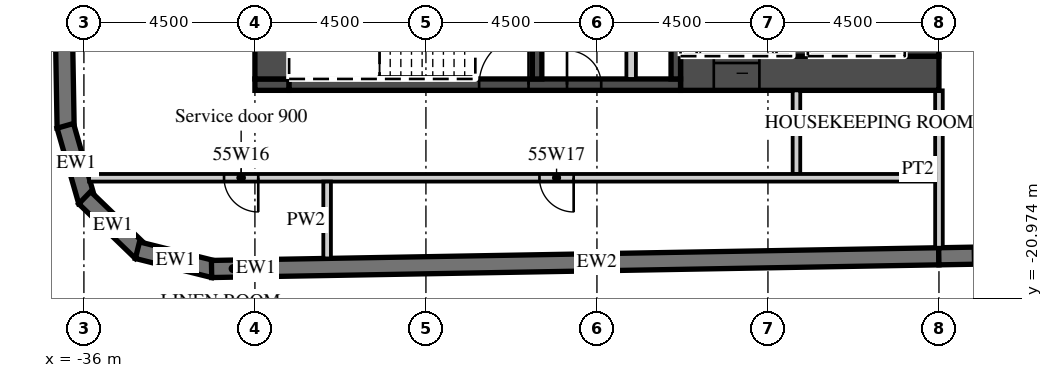
"""IFC4 building model, lengths in metres.
Left out: names, types, materials, properties, quantities, classifications, styles, units other than length and angle.
Written with IfcOpenShell. Run it as: python <this file> out.ifc"""

import sys

from ifc_helpers import new_model, si_unit, direction, frame, frame_2d, origin, place, context, subcontext, project, spatial, polyline, rectangle, outline, extrude, element, fill, save


model = new_model("IFC4")
c1 = context("Model", 3, precision=1e-05, world=origin(), true_north=direction((0.0, 1.0)))
c2 = subcontext(c1, "Body", "Model", "MODEL_VIEW")
j1 = project(units=[si_unit("LENGTHUNIT", "METRE"), si_unit("PLANEANGLEUNIT", "RADIAN")], contexts=[c1])
p1 = place(None, origin())
s1 = spatial("IfcSite", under=j1, at=p1, CompositionType="ELEMENT")
p2 = place(p1, origin())
s2 = spatial("IfcBuilding", under=s1, at=p2, CompositionType="ELEMENT")
p3 = place(p2, frame((0.0, 0.0, 227.6)))
s3 = spatial("IfcBuildingStorey", under=s2, at=p3, CompositionType="ELEMENT", Elevation=227.6)
p4 = place(p3, frame((-37.057, 16.503, 0.0), z_axis=(0.0, 0.0, 1.0), x_axis=(0.017452279857, -0.999847697366, 0.0)))
e1 = element("IfcWall", 1, at=p4, inside=s3, PredefinedType="SOLIDWALL", context=c2, shape_type="SweptSolid", body=[
    extrude(rectangle(XDim=33.0, YDim=0.45, at=frame_2d((16.5, 0.0))), origin(), (0.0, 0.0, 1.0), 3.02),
])
p5 = place(p3, frame((-36.49, -16.434, 0.0), z_axis=(0.0, 0.0, 1.0), x_axis=(0.275577603096, -0.961278827745, 0.0)))
e2 = element("IfcWall", 2, at=p5, inside=s3, PredefinedType="SOLIDWALL", context=c2, shape_type="SweptSolid", body=[
    extrude(outline(polyline([(0.0, -0.225), (2.071, -0.225), (1.95, 0.225), (0.121, 0.225), (0.0, -0.225)])), origin(), (0.0, 0.0, 1.0), 3.02),
])
p6 = place(p3, frame((-35.979, -18.324, 0.0), z_axis=(0.0, 0.0, 1.0), x_axis=(0.719320193998, -0.694678672846, 0.0)))
e3 = element("IfcWall", 3, at=p6, inside=s3, PredefinedType="SOLIDWALL", context=c2, shape_type="SweptSolid", body=[
    extrude(outline(polyline([(0.0, -0.225), (2.071, -0.225), (1.95, 0.225), (0.121, 0.225), (0.0, -0.225)])), origin(), (0.0, 0.0, 1.0), 3.02),
])
p7 = place(p3, frame((-34.591, -19.706, 0.0), z_axis=(0.0, 0.0, 1.0), x_axis=(0.970315655375, -0.241841950319, 0.0)))
e4 = element("IfcWall", 4, at=p7, inside=s3, PredefinedType="SOLIDWALL", context=c2, shape_type="SweptSolid", body=[
    extrude(outline(polyline([(0.0, -0.225), (2.071, -0.225), (1.95, 0.225), (0.121, 0.225), (0.0, -0.225)])), origin(), (0.0, 0.0, 1.0), 3.02),
])
p8 = place(p3, frame((-32.641, -20.2, 0.0), z_axis=(0.0, 0.0, 1.0), x_axis=(0.99984870815, 0.017394275206, 0.0)))
e5 = element("IfcWall", 5, at=p8, inside=s3, PredefinedType="SOLIDWALL", context=c2, shape_type="SweptSolid", body=[
    extrude(rectangle(XDim=1.137, YDim=0.45, at=frame_2d((0.568, 0.0))), origin(), (0.0, 0.0, 1.0), 3.02),
])
p9 = place(p3, frame((-31.504, -20.18, 0.0), z_axis=(0.0, 0.0, 1.0), x_axis=(0.999847677887, 0.017453395744, 0.0)))
e6 = element("IfcWall", 6, at=p9, inside=s3, PredefinedType="SOLIDWALL", context=c2, shape_type="SweptSolid", body=[
    extrude(rectangle(XDim=18.003, YDim=0.45, at=frame_2d((9.001, 0.0))), origin(), (0.0, 0.0, 1.0), 3.02),
])
p10 = place(p3, frame((-13.504, -19.866, 0.0), z_axis=(0.0, 0.0, 1.0), x_axis=(0.999847672978, 0.017453676992, 0.0)))
e7 = element("IfcWall", 7, at=p10, inside=s3, PredefinedType="SOLIDWALL", context=c2, shape_type="SweptSolid", body=[
    extrude(rectangle(XDim=52.86, YDim=0.45, at=frame_2d((26.43, 0.0))), origin(), (0.0, 0.0, 1.0), 3.02),
])
p11 = place(p10, frame((0.9, 0.0, 0.45)))
e8 = element("IfcOpeningElement", 8, at=p11, cuts=e7, PredefinedType="OPENING", context=c2, shape_type="SweptSolid", body=[
    extrude(rectangle(XDim=2.7, YDim=2.25, at=frame_2d((1.35, 1.125))), frame((0.0, 0.235, 0.0), z_axis=(0.0, -1.0, 0.0), x_axis=(1.0, 0.0, 0.0)), (0.0, 0.0, 1.0), 0.47),
])
p12 = place(p10, frame((5.401, 0.0, 0.45)))
e9 = element("IfcOpeningElement", 9, at=p12, cuts=e7, PredefinedType="OPENING", context=c2, shape_type="SweptSolid", body=[
    extrude(rectangle(XDim=2.7, YDim=2.25, at=frame_2d((1.35, 1.125))), frame((0.0, 0.235, 0.0), z_axis=(0.0, -1.0, 0.0), x_axis=(1.0, 0.0, 0.0)), (0.0, 0.0, 1.0), 0.47),
])
p13 = place(p10, frame((9.902, 0.0, 0.45)))
e10 = element("IfcOpeningElement", 10, at=p13, cuts=e7, PredefinedType="OPENING", context=c2, shape_type="SweptSolid", body=[
    extrude(rectangle(XDim=2.7, YDim=2.25, at=frame_2d((1.35, 1.125))), frame((0.0, 0.235, 0.0), z_axis=(0.0, -1.0, 0.0), x_axis=(1.0, 0.0, 0.0)), (0.0, 0.0, 1.0), 0.47),
])
p14 = place(p10, frame((14.402, 0.0, 0.45)))
e11 = element("IfcOpeningElement", 11, at=p14, cuts=e7, PredefinedType="OPENING", context=c2, shape_type="SweptSolid", body=[
    extrude(rectangle(XDim=2.7, YDim=2.25, at=frame_2d((1.35, 1.125))), frame((0.0, 0.235, 0.0), z_axis=(0.0, -1.0, 0.0), x_axis=(1.0, 0.0, 0.0)), (0.0, 0.0, 1.0), 0.47),
])
p15 = place(p10, frame((18.903, 0.0, 0.45)))
e12 = element("IfcOpeningElement", 12, at=p15, cuts=e7, PredefinedType="OPENING", context=c2, shape_type="SweptSolid", body=[
    extrude(rectangle(XDim=2.7, YDim=2.25, at=frame_2d((1.35, 1.125))), frame((0.0, 0.235, 0.0), z_axis=(0.0, -1.0, 0.0), x_axis=(1.0, 0.0, 0.0)), (0.0, 0.0, 1.0), 0.47),
])
p16 = place(p10, frame((23.404, 0.0, 0.45)))
e13 = element("IfcOpeningElement", 13, at=p16, cuts=e7, PredefinedType="OPENING", context=c2, shape_type="SweptSolid", body=[
    extrude(rectangle(XDim=2.7, YDim=2.25, at=frame_2d((1.35, 1.125))), frame((0.0, 0.235, 0.0), z_axis=(0.0, -1.0, 0.0), x_axis=(1.0, 0.0, 0.0)), (0.0, 0.0, 1.0), 0.47),
])
p17 = place(p10, frame((27.904, 0.0, 0.45)))
e14 = element("IfcOpeningElement", 14, at=p17, cuts=e7, PredefinedType="OPENING", context=c2, shape_type="SweptSolid", body=[
    extrude(rectangle(XDim=2.7, YDim=2.25, at=frame_2d((1.35, 1.125))), frame((0.0, 0.235, 0.0), z_axis=(0.0, -1.0, 0.0), x_axis=(1.0, 0.0, 0.0)), (0.0, 0.0, 1.0), 0.47),
])
p18 = place(p10, frame((32.405, 0.0, 0.45)))
e15 = element("IfcOpeningElement", 15, at=p18, cuts=e7, PredefinedType="OPENING", context=c2, shape_type="SweptSolid", body=[
    extrude(rectangle(XDim=2.7, YDim=2.25, at=frame_2d((1.35, 1.125))), frame((0.0, 0.235, 0.0), z_axis=(0.0, -1.0, 0.0), x_axis=(1.0, 0.0, 0.0)), (0.0, 0.0, 1.0), 0.47),
])
p19 = place(p10, frame((36.906, 0.0, 0.45)))
e16 = element("IfcOpeningElement", 16, at=p19, cuts=e7, PredefinedType="OPENING", context=c2, shape_type="SweptSolid", body=[
    extrude(rectangle(XDim=2.7, YDim=2.25, at=frame_2d((1.35, 1.125))), frame((0.0, 0.235, 0.0), z_axis=(0.0, -1.0, 0.0), x_axis=(1.0, 0.0, 0.0)), (0.0, 0.0, 1.0), 0.47),
])
p20 = place(p10, frame((41.406, 0.0, 0.45)))
e17 = element("IfcOpeningElement", 17, at=p20, cuts=e7, PredefinedType="OPENING", context=c2, shape_type="SweptSolid", body=[
    extrude(rectangle(XDim=2.7, YDim=2.25, at=frame_2d((1.35, 1.125))), frame((0.0, 0.235, 0.0), z_axis=(0.0, -1.0, 0.0), x_axis=(1.0, 0.0, 0.0)), (0.0, 0.0, 1.0), 0.47),
])
p21 = place(p10, frame((45.907, 0.0, 0.45)))
e18 = element("IfcOpeningElement", 18, at=p21, cuts=e7, PredefinedType="OPENING", context=c2, shape_type="SweptSolid", body=[
    extrude(rectangle(XDim=2.7, YDim=2.25, at=frame_2d((1.35, 1.125))), frame((0.0, 0.235, 0.0), z_axis=(0.0, -1.0, 0.0), x_axis=(1.0, 0.0, 0.0)), (0.0, 0.0, 1.0), 0.47),
])
p22 = place(p3, frame((-13.5, -19.641, 0.0), z_axis=(0.0, 0.0, 1.0), x_axis=(0.0, 1.0, 0.0)))
e19 = element("IfcWall", 19, at=p22, inside=s3, PredefinedType="PARTITIONING", context=c2, shape_type="SweptSolid", body=[
    extrude(rectangle(XDim=4.141, YDim=0.2, at=frame_2d((2.071, 0.0))), origin(), (0.0, 0.0, 1.0), 3.02),
])
p23 = place(p3, frame((-20.3, -15.05, 0.0), z_axis=(0.0, 0.0, 1.0), x_axis=(1.0, 0.0, 0.0)))
e20 = element("IfcWall", 20, at=p23, inside=s3, PredefinedType="SHEAR", context=c2, shape_type="SweptSolid", body=[
    extrude(rectangle(XDim=6.8, YDim=0.9, at=frame_2d((3.4, 0.0))), origin(), (0.0, 0.0, 1.0), 3.02),
])
p24 = place(p23, frame((0.875, 0.0, 0.0)))
e21 = element("IfcOpeningElement", 21, at=p24, cuts=e20, PredefinedType="OPENING", context=c2, shape_type="SweptSolid", body=[
    extrude(rectangle(XDim=1.2, YDim=2.1, at=frame_2d((0.6, 1.05))), frame((0.0, 0.46, 0.0), z_axis=(0.0, -1.0, 0.0), x_axis=(1.0, 0.0, 0.0)), (0.0, 0.0, 1.0), 0.92),
])
p25 = place(p3, frame((-31.5, -15.35, 0.0), z_axis=(0.0, 0.0, 1.0), x_axis=(1.0, 0.0, 0.0)))
e22 = element("IfcWall", 22, at=p25, inside=s3, PredefinedType="SHEAR", context=c2, shape_type="SweptSolid", body=[
    extrude(rectangle(XDim=0.9, YDim=0.3, at=frame_2d((0.45, 0.0))), origin(), (0.0, 0.0, 1.0), 3.02),
])
p26 = place(p3, frame((-30.6, -15.35, 0.0), z_axis=(0.0, 0.0, 1.0), x_axis=(1.0, 0.0, 0.0)))
e23 = element("IfcWall", 23, at=p26, inside=s3, PredefinedType="SHEAR", context=c2, shape_type="SweptSolid", body=[
    extrude(rectangle(XDim=10.3, YDim=0.3, at=frame_2d((5.15, 0.0))), origin(), (0.0, 0.0, 1.0), 3.02),
])
p27 = place(p26, frame((5.0, 0.0, 0.0)))
e24 = element("IfcOpeningElement", 24, at=p27, cuts=e23, PredefinedType="OPENING", context=c2, shape_type="SweptSolid", body=[
    extrude(rectangle(XDim=1.3, YDim=2.1, at=frame_2d((0.65, 1.05))), frame((0.0, 0.16, 0.0), z_axis=(0.0, -1.0, 0.0), x_axis=(1.0, 0.0, 0.0)), (0.0, 0.0, 1.0), 0.32),
])
p28 = place(p26, frame((7.312, 0.0, 0.0)))
e25 = element("IfcOpeningElement", 25, at=p28, cuts=e23, PredefinedType="OPENING", context=c2, shape_type="SweptSolid", body=[
    extrude(rectangle(XDim=0.9, YDim=2.1, at=frame_2d((0.45, 1.05))), frame((0.0, 0.16, 0.0), z_axis=(0.0, -1.0, 0.0), x_axis=(1.0, 0.0, 0.0)), (0.0, 0.0, 1.0), 0.32),
])
p29 = place(p3, frame((-31.05, -15.2, 0.0), z_axis=(0.0, 0.0, 1.0), x_axis=(0.0, 1.0, 0.0)))
e26 = element("IfcWall", 26, at=p29, inside=s3, PredefinedType="SHEAR", context=c2, shape_type="SweptSolid", body=[
    extrude(rectangle(XDim=12.8, YDim=0.9, at=frame_2d((6.4, 0.0))), origin(), (0.0, 0.0, 1.0), 3.02),
])
p30 = place(p29, frame((11.5, 0.0, 0.0)))
e27 = element("IfcOpeningElement", 27, at=p30, cuts=e26, PredefinedType="OPENING", context=c2, shape_type="SweptSolid", body=[
    extrude(rectangle(XDim=1.1, YDim=2.1, at=frame_2d((0.55, 1.05))), frame((0.0, 0.46, 0.0), z_axis=(0.0, -1.0, 0.0), x_axis=(1.0, 0.0, 0.0)), (0.0, 0.0, 1.0), 0.92),
])
p31 = place(p3, frame((-13.95, -14.6, 0.0), z_axis=(0.0, 0.0, 1.0), x_axis=(0.0, 1.0, 0.0)))
e28 = element("IfcWall", 28, at=p31, inside=s3, PredefinedType="SHEAR", context=c2, shape_type="SweptSolid", body=[
    extrude(rectangle(XDim=12.2, YDim=0.9, at=frame_2d((6.1, 0.0))), origin(), (0.0, 0.0, 1.0), 3.02),
])
p32 = place(p3, frame((-17.15, -14.6, 0.0), z_axis=(0.0, 0.0, 1.0), x_axis=(0.0, 1.0, 0.0)))
e29 = element("IfcWall", 29, at=p32, inside=s3, PredefinedType="SHEAR", context=c2, shape_type="SweptSolid", body=[
    extrude(rectangle(XDim=5.8, YDim=0.4, at=frame_2d((2.9, 0.0))), origin(), (0.0, 0.0, 1.0), 3.02),
])
for number, where, z_axis, x_axis in (
    (30, (-20.425, -15.2, 0.0), (0.0, 0.0, 1.0), (0.0, 1.0, 0.0)),
    (31, (-24.075, -15.2, 0.0), (0.0, 0.0, 1.0), (0.0, 1.0, 0.0)),
):
    element("IfcWall", number, at=place(p3, frame(where, z_axis=z_axis, x_axis=x_axis)), inside=s3, PredefinedType="SHEAR", context=c2, shape_type="SweptSolid", body=[
        extrude(rectangle(XDim=3.25, YDim=0.25, at=frame_2d((1.625, 0.0))), origin(), (0.0, 0.0, 1.0), 3.02),
    ])
p33 = place(p3, frame((-21.6, -15.2, 0.0), z_axis=(0.0, 0.0, 1.0), x_axis=(0.0, 1.0, 0.0)))
e32 = element("IfcWall", 32, at=p33, inside=s3, PredefinedType="PARTITIONING", context=c2, shape_type="SweptSolid", body=[
    extrude(rectangle(XDim=3.25, YDim=0.25, at=frame_2d((1.625, 0.0))), origin(), (0.0, 0.0, 1.0), 3.02),
])
p34 = place(p3, frame((-17.25, -17.7, 0.0), z_axis=(0.0, 0.0, 1.0), x_axis=(0.0, 1.0, 0.0)))
e33 = element("IfcWall", 33, at=p34, inside=s3, PredefinedType="PARTITIONING", context=c2, shape_type="SweptSolid", body=[
    extrude(rectangle(XDim=2.2, YDim=0.2, at=frame_2d((1.1, 0.0))), origin(), (0.0, 0.0, 1.0), 3.02),
])
p35 = place(p3, frame((-35.864, -17.8, 0.0), z_axis=(0.0, 0.0, 1.0), x_axis=(1.0, 0.0, 0.0)))
e34 = element("IfcWall", 34, at=p35, inside=s3, PredefinedType="PARTITIONING", context=c2, shape_type="SweptSolid", body=[
    extrude(rectangle(XDim=22.264, YDim=0.2, at=frame_2d((11.132, 0.0))), origin(), (0.0, 0.0, 1.0), 3.02),
])
p36 = place(p35, frame((3.551, 0.0, 0.0)))
e35 = element("IfcOpeningElement", 35, at=p36, cuts=e34, PredefinedType="OPENING", context=c2, shape_type="SweptSolid", body=[
    extrude(rectangle(XDim=0.9, YDim=2.1, at=frame_2d((0.45, 1.05))), frame((0.0, 0.11, 0.0), z_axis=(0.0, -1.0, 0.0), x_axis=(1.0, 0.0, 0.0)), (0.0, 0.0, 1.0), 0.22),
])
p37 = place(p35, frame((11.851, 0.0, 0.0)))
e36 = element("IfcOpeningElement", 36, at=p37, cuts=e34, PredefinedType="OPENING", context=c2, shape_type="SweptSolid", body=[
    extrude(rectangle(XDim=0.9, YDim=2.1, at=frame_2d((0.45, 1.05))), frame((0.0, 0.11, 0.0), z_axis=(0.0, -1.0, 0.0), x_axis=(1.0, 0.0, 0.0)), (0.0, 0.0, 1.0), 0.22),
])
p38 = place(p3, frame((-29.6, -19.922, 0.0), z_axis=(0.0, 0.0, 1.0), x_axis=(0.0, 1.0, 0.0)))
e37 = element("IfcWall", 37, at=p38, inside=s3, PredefinedType="PARTITIONING", context=c2, shape_type="SweptSolid", body=[
    extrude(rectangle(XDim=2.022, YDim=0.2, at=frame_2d((1.011, 0.0))), origin(), (0.0, 0.0, 1.0), 3.02),
])
p39 = place(p11, origin())
e38 = element("IfcWindow", 38, at=p39, inside=s3, PartitioningType="SINGLE_PANEL", PredefinedType="WINDOW", context=c2, shape_type="SweptSolid", body=[
    extrude(rectangle(XDim=2.7, YDim=2.25, at=frame_2d((1.35, 1.125))), frame((0.0, 0.09, 0.0), z_axis=(0.0, -1.0, 0.0), x_axis=(1.0, 0.0, 0.0)), (0.0, 0.0, 1.0), 0.06),
])
fill(e8, e38)
p40 = place(p24, origin())
e39 = element("IfcDoor", 39, at=p40, inside=s3, OperationType="SLIDING_TO_LEFT", PredefinedType="DOOR", context=c2, shape_type="SweptSolid", body=[
    extrude(rectangle(XDim=1.2, YDim=2.1, at=frame_2d((0.6, 1.05))), frame((0.0, 0.025, 0.0), z_axis=(0.0, -1.0, 0.0), x_axis=(1.0, 0.0, 0.0)), (0.0, 0.0, 1.0), 0.05),
])
fill(e21, e39)
p41 = place(p27, origin())
e40 = element("IfcDoor", 40, at=p41, inside=s3, OperationType="SINGLE_SWING_RIGHT", PredefinedType="DOOR", context=c2, shape_type="SweptSolid", body=[
    extrude(rectangle(XDim=1.3, YDim=2.1, at=frame_2d((0.65, 1.05))), frame((0.0, 0.025, 0.0), z_axis=(0.0, -1.0, 0.0), x_axis=(1.0, 0.0, 0.0)), (0.0, 0.0, 1.0), 0.05),
])
fill(e24, e40)
p42 = place(p28, origin())
e41 = element("IfcDoor", 41, at=p42, inside=s3, OperationType="SINGLE_SWING_LEFT", PredefinedType="DOOR", context=c2, shape_type="SweptSolid", body=[
    extrude(rectangle(XDim=0.9, YDim=2.1, at=frame_2d((0.45, 1.05))), frame((0.0, 0.025, 0.0), z_axis=(0.0, -1.0, 0.0), x_axis=(1.0, 0.0, 0.0)), (0.0, 0.0, 1.0), 0.05),
])
fill(e25, e41)
p43 = place(p36, origin())
e42 = element("IfcDoor", 42, at=p43, inside=s3, OperationType="SINGLE_SWING_RIGHT", PredefinedType="DOOR", context=c2, shape_type="SweptSolid", body=[
    extrude(rectangle(XDim=0.9, YDim=2.1, at=frame_2d((0.45, 1.05))), frame((0.0, 0.025, 0.0), z_axis=(0.0, -1.0, 0.0), x_axis=(1.0, 0.0, 0.0)), (0.0, 0.0, 1.0), 0.05),
])
fill(e35, e42)
p44 = place(p37, origin())
e43 = element("IfcDoor", 43, at=p44, inside=s3, OperationType="SINGLE_SWING_RIGHT", PredefinedType="DOOR", context=c2, shape_type="SweptSolid", body=[
    extrude(rectangle(XDim=0.9, YDim=2.1, at=frame_2d((0.45, 1.05))), frame((0.0, 0.025, 0.0), z_axis=(0.0, -1.0, 0.0), x_axis=(1.0, 0.0, 0.0)), (0.0, 0.0, 1.0), 0.05),
])
fill(e36, e43)
save(model, sys.argv[1])
